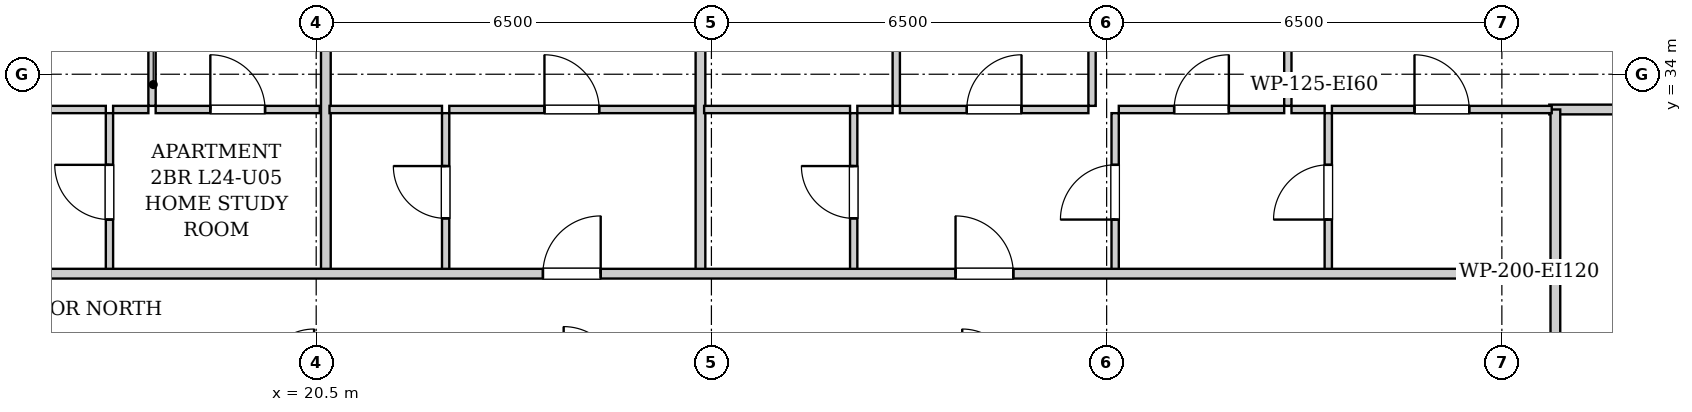
"""IFC4 building model, lengths in metres.
Left out: names, types, materials, properties, quantities, classifications, styles, units other than length and angle.
Written with IfcOpenShell. Run it as: python <this file> out.ifc"""

import sys

from ifc_helpers import new_model, si_unit, direction, frame, frame_2d, origin, place, context, subcontext, project, spatial, rectangle, extrude, element, fill, save


model = new_model("IFC4")
c1 = context("Model", 3, precision=1e-05, world=origin(), true_north=direction((0.0, 1.0)))
c2 = subcontext(c1, "Body", "Model", "MODEL_VIEW")
j1 = project(units=[si_unit("LENGTHUNIT", "METRE"), si_unit("PLANEANGLEUNIT", "RADIAN")], contexts=[c1])
p1 = place(None, origin())
s1 = spatial("IfcSite", under=j1, at=p1, CompositionType="ELEMENT")
p2 = place(p1, origin())
s2 = spatial("IfcBuilding", under=s1, at=p2, CompositionType="ELEMENT")
p3 = place(p2, frame((0.0, 0.0, 87.9)))
s3 = spatial("IfcBuildingStorey", under=s2, at=p3, CompositionType="ELEMENT", Elevation=87.9)
p4 = place(p3, frame((40.88, 28.98, 0.0), z_axis=(0.0, 0.0, 1.0), x_axis=(0.0, 1.0, 0.0)))
e1 = element("IfcWall", 1, at=p4, inside=s3, PredefinedType="PARTITIONING", context=c2, shape_type="SweptSolid", body=[
    extrude(rectangle(XDim=1.74, YDim=0.16, at=frame_2d((0.87, 0.0))), origin(), (0.0, 0.0, 1.0), 2.94),
])
p5 = place(p3, frame((17.1, 30.76, 0.0), z_axis=(0.0, 0.0, 1.0), x_axis=(0.0, 1.0, 0.0)))
e2 = element("IfcWall", 2, at=p5, inside=s3, PredefinedType="PARTITIONING", context=c2, shape_type="SweptSolid", body=[
    extrude(rectangle(XDim=2.6, YDim=0.12, at=frame_2d((1.3, 0.0))), origin(), (0.0, 0.0, 1.0), 2.94),
])
p6 = place(p5, frame((0.85, 0.0, 0.0)))
e3 = element("IfcOpeningElement", 3, at=p6, cuts=e2, PredefinedType="OPENING", context=c2, shape_type="SweptSolid", body=[
    extrude(rectangle(XDim=0.9, YDim=2.05, at=frame_2d((0.45, 1.025))), frame((0.0, 0.07, 0.0), z_axis=(0.0, -1.0, 0.0), x_axis=(1.0, 0.0, 0.0)), (0.0, 0.0, 1.0), 0.14),
])
p7 = place(p3, frame((14.26, 33.42, 0.0), z_axis=(0.0, 0.0, 1.0), x_axis=(1.0, 0.0, 0.0)))
e4 = element("IfcWall", 4, at=p7, inside=s3, PredefinedType="PARTITIONING", context=c2, shape_type="SweptSolid", body=[
    extrude(rectangle(XDim=2.78, YDim=0.12, at=frame_2d((1.39, 0.0))), origin(), (0.0, 0.0, 1.0), 2.94),
])
p8 = place(p7, frame((0.94, 0.0, 0.0)))
e5 = element("IfcOpeningElement", 5, at=p8, cuts=e4, PredefinedType="OPENING", context=c2, shape_type="SweptSolid", body=[
    extrude(rectangle(XDim=0.9, YDim=2.05, at=frame_2d((0.45, 1.025))), frame((0.0, 0.07, 0.0), z_axis=(0.0, -1.0, 0.0), x_axis=(1.0, 0.0, 0.0)), (0.0, 0.0, 1.0), 0.14),
])
p9 = place(p3, frame((17.16, 33.42, 0.0), z_axis=(0.0, 0.0, 1.0), x_axis=(1.0, 0.0, 0.0)))
e6 = element("IfcWall", 6, at=p9, inside=s3, PredefinedType="PARTITIONING", context=c2, shape_type="SweptSolid", body=[
    extrude(rectangle(XDim=0.58, YDim=0.12, at=frame_2d((0.29, 0.0))), origin(), (0.0, 0.0, 1.0), 2.94),
])
p10 = place(p3, frame((17.86, 33.42, 0.0), z_axis=(0.0, 0.0, 1.0), x_axis=(1.0, 0.0, 0.0)))
e7 = element("IfcWall", 7, at=p10, inside=s3, PredefinedType="PARTITIONING", context=c2, shape_type="SweptSolid", body=[
    extrude(rectangle(XDim=2.699, YDim=0.12, at=frame_2d((1.35, 0.0))), origin(), (0.0, 0.0, 1.0), 2.94),
])
p11 = place(p10, frame((0.899, 0.0, 0.0)))
e8 = element("IfcOpeningElement", 8, at=p11, cuts=e7, PredefinedType="OPENING", context=c2, shape_type="SweptSolid", body=[
    extrude(rectangle(XDim=0.9, YDim=2.05, at=frame_2d((0.45, 1.025))), frame((0.0, 0.07, 0.0), z_axis=(0.0, -1.0, 0.0), x_axis=(1.0, 0.0, 0.0)), (0.0, 0.0, 1.0), 0.14),
])
p12 = place(p3, frame((17.8, 33.48, 0.0), z_axis=(0.0, 0.0, 1.0), x_axis=(0.0, 1.0, 0.0)))
e9 = element("IfcWall", 9, at=p12, inside=s3, PredefinedType="PARTITIONING", context=c2, shape_type="SweptSolid", body=[
    extrude(rectangle(XDim=9.54, YDim=0.12, at=frame_2d((4.77, 0.0))), origin(), (0.0, 0.0, 1.0), 2.309),
])
p13 = place(p12, frame((4.305, 0.0, 0.0)))
e10 = element("IfcOpeningElement", 10, at=p13, cuts=e9, PredefinedType="OPENING", context=c2, shape_type="SweptSolid", body=[
    extrude(rectangle(XDim=0.9, YDim=2.05, at=frame_2d((0.45, 1.025))), frame((0.0, 0.07, 0.0), z_axis=(0.0, -1.0, 0.0), x_axis=(1.0, 0.0, 0.0)), (0.0, 0.0, 1.0), 0.14),
])
p14 = place(p3, frame((20.659, 30.76, 0.0), z_axis=(0.0, 0.0, 1.0), x_axis=(0.0, 1.0, 0.0)))
e11 = element("IfcWall", 11, at=p14, inside=s3, PredefinedType="PARTITIONING", context=c2, shape_type="SweptSolid", body=[
    extrude(rectangle(XDim=12.26, YDim=0.16, at=frame_2d((6.13, 0.0))), origin(), (0.0, 0.0, 1.0), 2.94),
])
p15 = place(p3, frame((22.629, 30.76, 0.0), z_axis=(0.0, 0.0, 1.0), x_axis=(0.0, 1.0, 0.0)))
e12 = element("IfcWall", 12, at=p15, inside=s3, PredefinedType="PARTITIONING", context=c2, shape_type="SweptSolid", body=[
    extrude(rectangle(XDim=2.6, YDim=0.12, at=frame_2d((1.3, 0.0))), origin(), (0.0, 0.0, 1.0), 2.94),
])
p16 = place(p15, frame((0.87, 0.0, 0.0)))
e13 = element("IfcOpeningElement", 13, at=p16, cuts=e12, PredefinedType="OPENING", context=c2, shape_type="SweptSolid", body=[
    extrude(rectangle(XDim=0.86, YDim=2.05, at=frame_2d((0.43, 1.025))), frame((0.0, 0.07, 0.0), z_axis=(0.0, -1.0, 0.0), x_axis=(1.0, 0.0, 0.0)), (0.0, 0.0, 1.0), 0.14),
])
p17 = place(p3, frame((20.719, 33.42, 0.0), z_axis=(0.0, 0.0, 1.0), x_axis=(1.0, 0.0, 0.0)))
e14 = element("IfcWall", 14, at=p17, inside=s3, PredefinedType="PARTITIONING", context=c2, shape_type="SweptSolid", body=[
    extrude(rectangle(XDim=1.85, YDim=0.12, at=frame_2d((0.925, 0.0))), origin(), (0.0, 0.0, 1.0), 2.94),
])
p18 = place(p3, frame((22.689, 33.42, 0.0), z_axis=(0.0, 0.0, 1.0), x_axis=(1.0, 0.0, 0.0)))
e15 = element("IfcWall", 15, at=p18, inside=s3, PredefinedType="PARTITIONING", context=c2, shape_type="SweptSolid", body=[
    extrude(rectangle(XDim=4.031, YDim=0.12, at=frame_2d((2.016, 0.0))), origin(), (0.0, 0.0, 1.0), 2.94),
])
p19 = place(p18, frame((1.565, 0.0, 0.0)))
e16 = element("IfcOpeningElement", 16, at=p19, cuts=e15, PredefinedType="OPENING", context=c2, shape_type="SweptSolid", body=[
    extrude(rectangle(XDim=0.9, YDim=2.05, at=frame_2d((0.45, 1.025))), frame((0.0, 0.07, 0.0), z_axis=(0.0, -1.0, 0.0), x_axis=(1.0, 0.0, 0.0)), (0.0, 0.0, 1.0), 0.14),
])
p20 = place(p3, frame((40.78, 33.42, 0.0), z_axis=(0.0, 0.0, 1.0), x_axis=(1.0, 0.0, 0.0)))
e17 = element("IfcWall", 17, at=p20, inside=s3, PredefinedType="PARTITIONING", context=c2, shape_type="SweptSolid", body=[
    extrude(rectangle(XDim=2.34, YDim=0.16, at=frame_2d((1.17, 0.0))), origin(), (0.0, 0.0, 1.0), 2.94),
])
p21 = place(p3, frame((40.88, 30.76, 0.0), z_axis=(0.0, 0.0, 1.0), x_axis=(0.0, 1.0, 0.0)))
e18 = element("IfcWall", 18, at=p21, inside=s3, PredefinedType="PARTITIONING", context=c2, shape_type="SweptSolid", body=[
    extrude(rectangle(XDim=2.66, YDim=0.16, at=frame_2d((1.33, 0.0))), origin(), (0.0, 0.0, 1.0), 2.94),
])
p22 = place(p3, frame((26.82, 30.76, 0.0), z_axis=(0.0, 0.0, 1.0), x_axis=(0.0, 1.0, 0.0)))
e19 = element("IfcWall", 19, at=p22, inside=s3, PredefinedType="PARTITIONING", context=c2, shape_type="SweptSolid", body=[
    extrude(rectangle(XDim=12.26, YDim=0.16, at=frame_2d((6.13, 0.0))), origin(), (0.0, 0.0, 1.0), 2.94),
])
p23 = place(p3, frame((29.34, 30.76, 0.0), z_axis=(0.0, 0.0, 1.0), x_axis=(0.0, 1.0, 0.0)))
e20 = element("IfcWall", 20, at=p23, inside=s3, PredefinedType="PARTITIONING", context=c2, shape_type="SweptSolid", body=[
    extrude(rectangle(XDim=2.6, YDim=0.12, at=frame_2d((1.3, 0.0))), origin(), (0.0, 0.0, 1.0), 2.94),
])
p24 = place(p23, frame((0.87, 0.0, 0.0)))
e21 = element("IfcOpeningElement", 21, at=p24, cuts=e20, PredefinedType="OPENING", context=c2, shape_type="SweptSolid", body=[
    extrude(rectangle(XDim=0.86, YDim=2.05, at=frame_2d((0.43, 1.025))), frame((0.0, 0.07, 0.0), z_axis=(0.0, -1.0, 0.0), x_axis=(1.0, 0.0, 0.0)), (0.0, 0.0, 1.0), 0.14),
])
p25 = place(p3, frame((26.88, 33.42, 0.0), z_axis=(0.0, 0.0, 1.0), x_axis=(1.0, 0.0, 0.0)))
e22 = element("IfcWall", 22, at=p25, inside=s3, PredefinedType="PARTITIONING", context=c2, shape_type="SweptSolid", body=[
    extrude(rectangle(XDim=2.4, YDim=0.12, at=frame_2d((1.2, 0.0))), origin(), (0.0, 0.0, 1.0), 2.94),
])
p26 = place(p3, frame((33.64, 30.76, 0.0), z_axis=(0.0, 0.0, 1.0), x_axis=(0.0, 1.0, 0.0)))
e23 = element("IfcWall", 23, at=p26, inside=s3, PredefinedType="PARTITIONING", context=c2, shape_type="SweptSolid", body=[
    extrude(rectangle(XDim=2.6, YDim=0.12, at=frame_2d((1.3, 0.0))), origin(), (0.0, 0.0, 1.0), 2.94),
])
p27 = place(p26, frame((0.85, 0.0, 0.0)))
e24 = element("IfcOpeningElement", 24, at=p27, cuts=e23, PredefinedType="OPENING", context=c2, shape_type="SweptSolid", body=[
    extrude(rectangle(XDim=0.9, YDim=2.05, at=frame_2d((0.45, 1.025))), frame((0.0, 0.07, 0.0), z_axis=(0.0, -1.0, 0.0), x_axis=(1.0, 0.0, 0.0)), (0.0, 0.0, 1.0), 0.14),
])
p28 = place(p3, frame((29.4, 33.42, 0.0), z_axis=(0.0, 0.0, 1.0), x_axis=(1.0, 0.0, 0.0)))
e25 = element("IfcWall", 25, at=p28, inside=s3, PredefinedType="PARTITIONING", context=c2, shape_type="SweptSolid", body=[
    extrude(rectangle(XDim=0.58, YDim=0.12, at=frame_2d((0.29, 0.0))), origin(), (0.0, 0.0, 1.0), 2.94),
])
p29 = place(p3, frame((30.1, 33.42, 0.0), z_axis=(0.0, 0.0, 1.0), x_axis=(1.0, 0.0, 0.0)))
e26 = element("IfcWall", 26, at=p29, inside=s3, PredefinedType="PARTITIONING", context=c2, shape_type="SweptSolid", body=[
    extrude(rectangle(XDim=3.1, YDim=0.12, at=frame_2d((1.55, 0.0))), origin(), (0.0, 0.0, 1.0), 2.94),
])
p30 = place(p29, frame((1.1, 0.0, 0.0)))
e27 = element("IfcOpeningElement", 27, at=p30, cuts=e26, PredefinedType="OPENING", context=c2, shape_type="SweptSolid", body=[
    extrude(rectangle(XDim=0.9, YDim=2.05, at=frame_2d((0.45, 1.025))), frame((0.0, 0.07, 0.0), z_axis=(0.0, -1.0, 0.0), x_axis=(1.0, 0.0, 0.0)), (0.0, 0.0, 1.0), 0.14),
])
p31 = place(p3, frame((37.145, 30.76, 0.0), z_axis=(0.0, 0.0, 1.0), x_axis=(0.0, 1.0, 0.0)))
e28 = element("IfcWall", 28, at=p31, inside=s3, PredefinedType="PARTITIONING", context=c2, shape_type="SweptSolid", body=[
    extrude(rectangle(XDim=2.6, YDim=0.12, at=frame_2d((1.3, 0.0))), origin(), (0.0, 0.0, 1.0), 2.94),
])
p32 = place(p31, frame((0.85, 0.0, 0.0)))
e29 = element("IfcOpeningElement", 29, at=p32, cuts=e28, PredefinedType="OPENING", context=c2, shape_type="SweptSolid", body=[
    extrude(rectangle(XDim=0.9, YDim=2.05, at=frame_2d((0.45, 1.025))), frame((0.0, 0.07, 0.0), z_axis=(0.0, -1.0, 0.0), x_axis=(1.0, 0.0, 0.0)), (0.0, 0.0, 1.0), 0.14),
])
p33 = place(p3, frame((33.7, 33.42, 0.0), z_axis=(0.0, 0.0, 1.0), x_axis=(1.0, 0.0, 0.0)))
e30 = element("IfcWall", 30, at=p33, inside=s3, PredefinedType="PARTITIONING", context=c2, shape_type="SweptSolid", body=[
    extrude(rectangle(XDim=2.72, YDim=0.12, at=frame_2d((1.36, 0.0))), origin(), (0.0, 0.0, 1.0), 2.94),
])
p34 = place(p33, frame((0.91, 0.0, 0.0)))
e31 = element("IfcOpeningElement", 31, at=p34, cuts=e30, PredefinedType="OPENING", context=c2, shape_type="SweptSolid", body=[
    extrude(rectangle(XDim=0.9, YDim=2.05, at=frame_2d((0.45, 1.025))), frame((0.0, 0.07, 0.0), z_axis=(0.0, -1.0, 0.0), x_axis=(1.0, 0.0, 0.0)), (0.0, 0.0, 1.0), 0.14),
])
p35 = place(p3, frame((36.54, 33.42, 0.0), z_axis=(0.0, 0.0, 1.0), x_axis=(1.0, 0.0, 0.0)))
e32 = element("IfcWall", 32, at=p35, inside=s3, PredefinedType="PARTITIONING", context=c2, shape_type="SweptSolid", body=[
    extrude(rectangle(XDim=0.545, YDim=0.12, at=frame_2d((0.272, 0.0))), origin(), (0.0, 0.0, 1.0), 2.94),
])
p36 = place(p3, frame((37.205, 33.42, 0.0), z_axis=(0.0, 0.0, 1.0), x_axis=(1.0, 0.0, 0.0)))
e33 = element("IfcWall", 33, at=p36, inside=s3, PredefinedType="PARTITIONING", context=c2, shape_type="SweptSolid", body=[
    extrude(rectangle(XDim=3.615, YDim=0.12, at=frame_2d((1.808, 0.0))), origin(), (0.0, 0.0, 1.0), 2.94),
])
p37 = place(p36, frame((1.358, 0.0, 0.0)))
e34 = element("IfcOpeningElement", 34, at=p37, cuts=e33, PredefinedType="OPENING", context=c2, shape_type="SweptSolid", body=[
    extrude(rectangle(XDim=0.9, YDim=2.05, at=frame_2d((0.45, 1.025))), frame((0.0, 0.07, 0.0), z_axis=(0.0, -1.0, 0.0), x_axis=(1.0, 0.0, 0.0)), (0.0, 0.0, 1.0), 0.14),
])
p38 = place(p3, frame((30.04, 33.48, 0.0), z_axis=(0.0, 0.0, 1.0), x_axis=(0.0, 1.0, 0.0)))
e35 = element("IfcWall", 35, at=p38, inside=s3, PredefinedType="PARTITIONING", context=c2, shape_type="SweptSolid", body=[
    extrude(rectangle(XDim=9.54, YDim=0.12, at=frame_2d((4.77, 0.0))), origin(), (0.0, 0.0, 1.0), 2.94),
])
p39 = place(p38, frame((4.305, 0.0, 0.0)))
e36 = element("IfcOpeningElement", 36, at=p39, cuts=e35, PredefinedType="OPENING", context=c2, shape_type="SweptSolid", body=[
    extrude(rectangle(XDim=0.9, YDim=2.05, at=frame_2d((0.45, 1.025))), frame((0.0, 0.07, 0.0), z_axis=(0.0, -1.0, 0.0), x_axis=(1.0, 0.0, 0.0)), (0.0, 0.0, 1.0), 0.14),
])
p40 = place(p3, frame((33.26, 33.48, 0.0), z_axis=(0.0, 0.0, 1.0), x_axis=(0.0, 1.0, 0.0)))
e37 = element("IfcWall", 37, at=p40, inside=s3, PredefinedType="PARTITIONING", context=c2, shape_type="SweptSolid", body=[
    extrude(rectangle(XDim=9.54, YDim=0.12, at=frame_2d((4.77, 0.0))), origin(), (0.0, 0.0, 1.0), 2.309),
])
p41 = place(p40, frame((4.305, 0.0, 0.0)))
e38 = element("IfcOpeningElement", 38, at=p41, cuts=e37, PredefinedType="OPENING", context=c2, shape_type="SweptSolid", body=[
    extrude(rectangle(XDim=0.9, YDim=2.05, at=frame_2d((0.45, 1.025))), frame((0.0, 0.07, 0.0), z_axis=(0.0, -1.0, 0.0), x_axis=(1.0, 0.0, 0.0)), (0.0, 0.0, 1.0), 0.14),
])
p42 = place(p3, frame((36.48, 33.48, 0.0), z_axis=(0.0, 0.0, 1.0), x_axis=(0.0, 1.0, 0.0)))
e39 = element("IfcWall", 39, at=p42, inside=s3, PredefinedType="PARTITIONING", context=c2, shape_type="SweptSolid", body=[
    extrude(rectangle(XDim=7.39, YDim=0.12, at=frame_2d((3.695, 0.0))), origin(), (0.0, 0.0, 1.0), 2.94),
])
p43 = place(p42, frame((3.245, 0.0, 0.0)))
e40 = element("IfcOpeningElement", 40, at=p43, cuts=e39, PredefinedType="OPENING", context=c2, shape_type="SweptSolid", body=[
    extrude(rectangle(XDim=0.9, YDim=2.05, at=frame_2d((0.45, 1.025))), frame((0.0, 0.07, 0.0), z_axis=(0.0, -1.0, 0.0), x_axis=(1.0, 0.0, 0.0)), (0.0, 0.0, 1.0), 0.14),
])
p44 = place(p3, frame((10.05, 30.72, 0.0), z_axis=(0.0, 0.0, 1.0), x_axis=(1.0, 0.0, 0.0)))
e41 = element("IfcWall", 41, at=p44, inside=s3, PredefinedType="PARTITIONING", context=c2, shape_type="SweptSolid", body=[
    extrude(rectangle(XDim=30.8, YDim=0.16, at=frame_2d((15.4, 0.0))), origin(), (0.0, 0.0, 1.0), 2.94),
])
p45 = place(p44, frame((4.295, 0.0, 0.0)))
e42 = element("IfcOpeningElement", 42, at=p45, cuts=e41, PredefinedType="OPENING", context=c2, shape_type="SweptSolid", body=[
    extrude(rectangle(XDim=0.95, YDim=2.1, at=frame_2d((0.475, 1.05))), frame((0.0, 0.09, 0.0), z_axis=(0.0, -1.0, 0.0), x_axis=(1.0, 0.0, 0.0)), (0.0, 0.0, 1.0), 0.18),
])
p46 = place(p44, frame((14.179, 0.0, 0.0)))
e43 = element("IfcOpeningElement", 43, at=p46, cuts=e41, PredefinedType="OPENING", context=c2, shape_type="SweptSolid", body=[
    extrude(rectangle(XDim=0.95, YDim=2.1, at=frame_2d((0.475, 1.05))), frame((0.0, 0.09, 0.0), z_axis=(0.0, -1.0, 0.0), x_axis=(1.0, 0.0, 0.0)), (0.0, 0.0, 1.0), 0.18),
])
p47 = place(p44, frame((20.965, 0.0, 0.0)))
e44 = element("IfcOpeningElement", 44, at=p47, cuts=e41, PredefinedType="OPENING", context=c2, shape_type="SweptSolid", body=[
    extrude(rectangle(XDim=0.95, YDim=2.1, at=frame_2d((0.475, 1.05))), frame((0.0, 0.09, 0.0), z_axis=(0.0, -1.0, 0.0), x_axis=(1.0, 0.0, 0.0)), (0.0, 0.0, 1.0), 0.18),
])
p48 = place(p6, origin())
e45 = element("IfcDoor", 45, at=p48, inside=s3, OperationType="SINGLE_SWING_RIGHT", PredefinedType="DOOR", context=c2, shape_type="SweptSolid", body=[
    extrude(rectangle(XDim=0.9, YDim=2.05, at=frame_2d((0.45, 1.025))), frame((0.0, 0.025, 0.0), z_axis=(0.0, -1.0, 0.0), x_axis=(1.0, 0.0, 0.0)), (0.0, 0.0, 1.0), 0.05),
])
fill(e3, e45)
p49 = place(p11, origin())
e46 = element("IfcDoor", 46, at=p49, inside=s3, OperationType="SINGLE_SWING_LEFT", PredefinedType="DOOR", context=c2, shape_type="SweptSolid", body=[
    extrude(rectangle(XDim=0.9, YDim=2.05, at=frame_2d((0.45, 1.025))), frame((0.0, 0.025, 0.0), z_axis=(0.0, -1.0, 0.0), x_axis=(1.0, 0.0, 0.0)), (0.0, 0.0, 1.0), 0.05),
])
fill(e8, e46)
p50 = place(p16, origin())
e47 = element("IfcDoor", 47, at=p50, inside=s3, OperationType="SINGLE_SWING_RIGHT", PredefinedType="DOOR", context=c2, shape_type="SweptSolid", body=[
    extrude(rectangle(XDim=0.86, YDim=2.05, at=frame_2d((0.43, 1.025))), frame((0.0, 0.025, 0.0), z_axis=(0.0, -1.0, 0.0), x_axis=(1.0, 0.0, 0.0)), (0.0, 0.0, 1.0), 0.05),
])
fill(e13, e47)
p51 = place(p19, origin())
e48 = element("IfcDoor", 48, at=p51, inside=s3, OperationType="SINGLE_SWING_LEFT", PredefinedType="DOOR", context=c2, shape_type="SweptSolid", body=[
    extrude(rectangle(XDim=0.9, YDim=2.05, at=frame_2d((0.45, 1.025))), frame((0.0, 0.025, 0.0), z_axis=(0.0, -1.0, 0.0), x_axis=(1.0, 0.0, 0.0)), (0.0, 0.0, 1.0), 0.05),
])
fill(e16, e48)
p52 = place(p24, origin())
e49 = element("IfcDoor", 49, at=p52, inside=s3, OperationType="SINGLE_SWING_RIGHT", PredefinedType="DOOR", context=c2, shape_type="SweptSolid", body=[
    extrude(rectangle(XDim=0.86, YDim=2.05, at=frame_2d((0.43, 1.025))), frame((0.0, 0.025, 0.0), z_axis=(0.0, -1.0, 0.0), x_axis=(1.0, 0.0, 0.0)), (0.0, 0.0, 1.0), 0.05),
])
fill(e21, e49)
p53 = place(p27, origin())
e50 = element("IfcDoor", 50, at=p53, inside=s3, OperationType="SINGLE_SWING_LEFT", PredefinedType="DOOR", context=c2, shape_type="SweptSolid", body=[
    extrude(rectangle(XDim=0.9, YDim=2.05, at=frame_2d((0.45, 1.025))), frame((0.0, 0.025, 0.0), z_axis=(0.0, -1.0, 0.0), x_axis=(1.0, 0.0, 0.0)), (0.0, 0.0, 1.0), 0.05),
])
fill(e24, e50)
p54 = place(p30, origin())
e51 = element("IfcDoor", 51, at=p54, inside=s3, OperationType="SINGLE_SWING_RIGHT", PredefinedType="DOOR", context=c2, shape_type="SweptSolid", body=[
    extrude(rectangle(XDim=0.9, YDim=2.05, at=frame_2d((0.45, 1.025))), frame((0.0, 0.025, 0.0), z_axis=(0.0, -1.0, 0.0), x_axis=(1.0, 0.0, 0.0)), (0.0, 0.0, 1.0), 0.05),
])
fill(e27, e51)
p55 = place(p32, origin())
e52 = element("IfcDoor", 52, at=p55, inside=s3, OperationType="SINGLE_SWING_LEFT", PredefinedType="DOOR", context=c2, shape_type="SweptSolid", body=[
    extrude(rectangle(XDim=0.9, YDim=2.05, at=frame_2d((0.45, 1.025))), frame((0.0, 0.025, 0.0), z_axis=(0.0, -1.0, 0.0), x_axis=(1.0, 0.0, 0.0)), (0.0, 0.0, 1.0), 0.05),
])
fill(e29, e52)
p56 = place(p34, origin())
e53 = element("IfcDoor", 53, at=p56, inside=s3, OperationType="SINGLE_SWING_RIGHT", PredefinedType="DOOR", context=c2, shape_type="SweptSolid", body=[
    extrude(rectangle(XDim=0.9, YDim=2.05, at=frame_2d((0.45, 1.025))), frame((0.0, 0.025, 0.0), z_axis=(0.0, -1.0, 0.0), x_axis=(1.0, 0.0, 0.0)), (0.0, 0.0, 1.0), 0.05),
])
fill(e31, e53)
p57 = place(p37, origin())
e54 = element("IfcDoor", 54, at=p57, inside=s3, OperationType="SINGLE_SWING_LEFT", PredefinedType="DOOR", context=c2, shape_type="SweptSolid", body=[
    extrude(rectangle(XDim=0.9, YDim=2.05, at=frame_2d((0.45, 1.025))), frame((0.0, 0.025, 0.0), z_axis=(0.0, -1.0, 0.0), x_axis=(1.0, 0.0, 0.0)), (0.0, 0.0, 1.0), 0.05),
])
fill(e34, e54)
p58 = place(p46, origin())
e55 = element("IfcDoor", 55, at=p58, inside=s3, OperationType="SINGLE_SWING_RIGHT", PredefinedType="DOOR", context=c2, shape_type="SweptSolid", body=[
    extrude(rectangle(XDim=0.95, YDim=2.1, at=frame_2d((0.475, 1.05))), frame((0.0, 0.025, 0.0), z_axis=(0.0, -1.0, 0.0), x_axis=(1.0, 0.0, 0.0)), (0.0, 0.0, 1.0), 0.05),
])
fill(e43, e55)
p59 = place(p47, origin())
e56 = element("IfcDoor", 56, at=p59, inside=s3, OperationType="SINGLE_SWING_LEFT", PredefinedType="DOOR", context=c2, shape_type="SweptSolid", body=[
    extrude(rectangle(XDim=0.95, YDim=2.1, at=frame_2d((0.475, 1.05))), frame((0.0, 0.025, 0.0), z_axis=(0.0, -1.0, 0.0), x_axis=(1.0, 0.0, 0.0)), (0.0, 0.0, 1.0), 0.05),
])
fill(e44, e56)
save(model, sys.argv[1])
